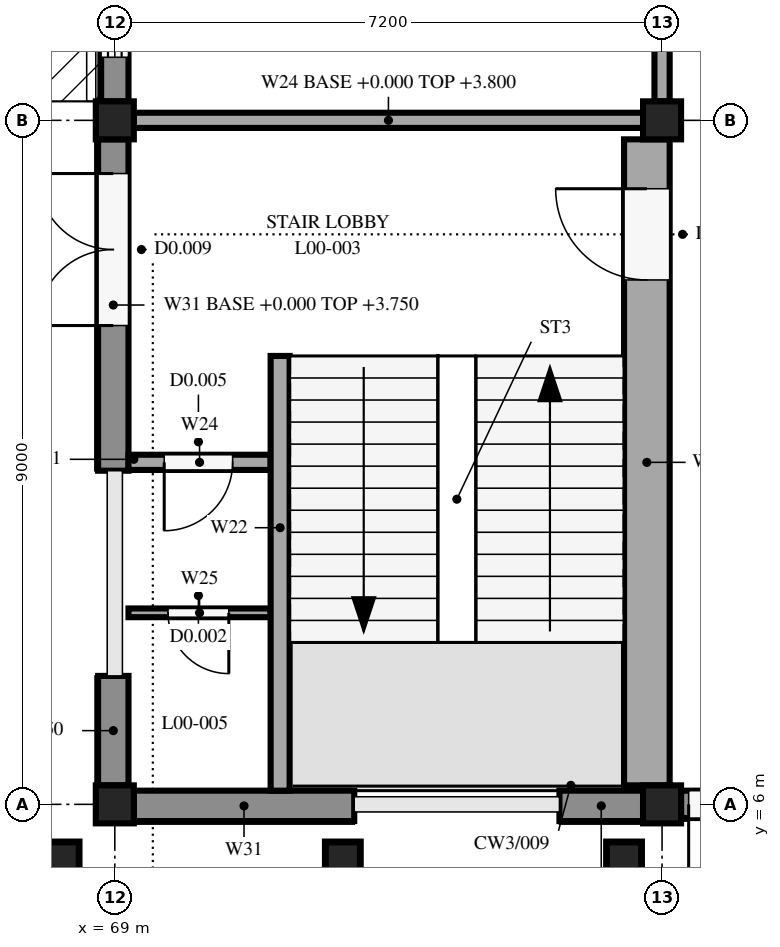
"""IFC4 building model, lengths in metres.
Left out: names, types, materials, properties, quantities, classifications, styles, units other than length and angle.
Written with IfcOpenShell. Run it as: python <this file> out.ifc"""

import sys

from ifc_helpers import new_model, si_unit, direction, frame, frame_2d, origin, origin_2d, place, context, subcontext, project, spatial, rectangle, extrude, element, fill, save


model = new_model("IFC4")
c1 = context("Model", 3, precision=1e-05, world=origin(), true_north=direction((0.0, 1.0)))
c2 = subcontext(c1, "Body", "Model", "MODEL_VIEW")
j1 = project(units=[si_unit("LENGTHUNIT", "METRE"), si_unit("PLANEANGLEUNIT", "RADIAN")], contexts=[c1])
p1 = place(None, origin())
s1 = spatial("IfcSite", under=j1, at=p1, CompositionType="ELEMENT")
p2 = place(p1, origin())
s2 = spatial("IfcBuilding", under=s1, at=p2, CompositionType="ELEMENT")
p3 = place(p2, origin())
s3 = spatial("IfcBuildingStorey", under=s2, at=p3, CompositionType="ELEMENT", Elevation=0.0)
for number, where, z_axis, x_axis in (
    (1, (69.0, 6.0, 0.0), (0.0, 0.0, 1.0), (1.0, 0.0, 0.0)),
    (2, (69.0, 15.0, 0.0), (0.0, 0.0, 1.0), (1.0, 0.0, 0.0)),
    (3, (76.2, 6.0, 0.0), (0.0, 0.0, 1.0), (1.0, 0.0, 0.0)),
    (4, (76.2, 15.0, 0.0), (0.0, 0.0, 1.0), (1.0, 0.0, 0.0)),
):
    element("IfcColumn", number, at=place(p3, frame(where, z_axis=z_axis, x_axis=x_axis)), inside=s3, PredefinedType="COLUMN", context=c2, shape_type="SweptSolid", body=[
        extrude(rectangle(XDim=0.5, YDim=0.5, at=origin_2d()), origin(), (0.0, 0.0, 1.0), 4.25),
    ])
for number, where, z_axis, x_axis in (
    (5, (68.3, 5.275, -0.3), (0.0, 0.0, 1.0), (1.0, 0.0, 0.0)),
    (6, (72.0, 5.275, -0.3), (0.0, 0.0, 1.0), (1.0, 0.0, 0.0)),
    (7, (75.7, 5.275, -0.3), (0.0, 0.0, 1.0), (1.0, 0.0, 0.0)),
):
    element("IfcColumn", number, at=place(p3, frame(where, z_axis=z_axis, x_axis=x_axis)), inside=s3, PredefinedType="COLUMN", context=c2, shape_type="SweptSolid", body=[
        extrude(rectangle(XDim=0.45, YDim=0.45, at=origin_2d()), origin(), (0.0, 0.0, 1.0), 3.95),
    ])
p4 = place(p3, frame((68.98, 6.25, 0.0), z_axis=(0.0, 0.0, 1.0), x_axis=(0.0, 1.0, 0.0)))
e8 = element("IfcWall", 8, at=p4, inside=s3, PredefinedType="STANDARD", context=c2, shape_type="SweptSolid", body=[
    extrude(rectangle(XDim=1.44, YDim=0.4, at=frame_2d((0.72, 0.0))), origin(), (0.0, 0.0, 1.0), 3.75),
])
p5 = place(p3, frame((68.98, 10.39, 0.0), z_axis=(0.0, 0.0, 1.0), x_axis=(0.0, 1.0, 0.0)))
e9 = element("IfcWall", 9, at=p5, inside=s3, PredefinedType="STANDARD", context=c2, shape_type="SweptSolid", body=[
    extrude(rectangle(XDim=4.36, YDim=0.4, at=frame_2d((2.18, 0.0))), origin(), (0.0, 0.0, 1.0), 3.75),
])
p6 = place(p5, frame((1.91, 0.0, 0.0)))
e10 = element("IfcOpeningElement", 10, at=p6, cuts=e9, PredefinedType="OPENING", context=c2, shape_type="SweptSolid", body=[
    extrude(rectangle(XDim=2.0, YDim=2.2, at=frame_2d((1.0, 1.1))), frame((0.0, 0.21, 0.0), z_axis=(0.0, -1.0, 0.0), x_axis=(1.0, 0.0, 0.0)), (0.0, 0.0, 1.0), 0.42),
])
p7 = place(p3, frame((69.0, 15.25, 0.0), z_axis=(0.0, 0.0, 1.0), x_axis=(0.0, 1.0, 0.0)))
e11 = element("IfcWall", 11, at=p7, inside=s3, PredefinedType="STANDARD", context=c2, shape_type="SweptSolid", body=[
    extrude(rectangle(XDim=8.5, YDim=0.36, at=frame_2d((4.25, 0.0))), origin(), (0.0, 0.0, 1.0), 3.75),
])
p8 = place(p7, frame((0.58, 0.0, 2.2)))
e12 = element("IfcOpeningElement", 12, at=p8, cuts=e11, PredefinedType="OPENING", context=c2, shape_type="SweptSolid", body=[
    extrude(rectangle(XDim=1.4, YDim=1.2, at=frame_2d((0.7, 0.6))), frame((0.0, 0.19, 0.0), z_axis=(0.0, -1.0, 0.0), x_axis=(1.0, 0.0, 0.0)), (0.0, 0.0, 1.0), 0.38),
])
p9 = place(p7, frame((3.625, 0.0, 0.0)))
e13 = element("IfcOpeningElement", 13, at=p9, cuts=e11, PredefinedType="OPENING", context=c2, shape_type="SweptSolid", body=[
    extrude(rectangle(XDim=1.2, YDim=2.1, at=frame_2d((0.6, 1.05))), frame((0.0, 0.19, 0.0), z_axis=(0.0, -1.0, 0.0), x_axis=(1.0, 0.0, 0.0)), (0.0, 0.0, 1.0), 0.38),
])
p10 = place(p7, frame((6.52, 0.0, 2.2)))
e14 = element("IfcOpeningElement", 14, at=p10, cuts=e11, PredefinedType="OPENING", context=c2, shape_type="SweptSolid", body=[
    extrude(rectangle(XDim=1.4, YDim=1.2, at=frame_2d((0.7, 0.6))), frame((0.0, 0.19, 0.0), z_axis=(0.0, -1.0, 0.0), x_axis=(1.0, 0.0, 0.0)), (0.0, 0.0, 1.0), 0.38),
])
p11 = place(p3, frame((72.15, 5.98, 0.0), z_axis=(0.0, 0.0, 1.0), x_axis=(-1.0, 0.0, 0.0)))
e15 = element("IfcWall", 15, at=p11, inside=s3, PredefinedType="STANDARD", context=c2, shape_type="SweptSolid", body=[
    extrude(rectangle(XDim=2.9, YDim=0.4, at=frame_2d((1.45, 0.0))), origin(), (0.0, 0.0, 1.0), 3.8),
])
p12 = place(p3, frame((75.95, 5.98, 0.0), z_axis=(0.0, 0.0, 1.0), x_axis=(-1.0, 0.0, 0.0)))
e16 = element("IfcWall", 16, at=p12, inside=s3, PredefinedType="STANDARD", context=c2, shape_type="SweptSolid", body=[
    extrude(rectangle(XDim=1.1, YDim=0.4, at=frame_2d((0.55, 0.0))), origin(), (0.0, 0.0, 1.0), 3.8),
])
p13 = place(p3, frame((78.65, 6.0, 0.0), z_axis=(0.0, 0.0, 1.0), x_axis=(-1.0, 0.0, 0.0)))
e17 = element("IfcWall", 17, at=p13, inside=s3, PredefinedType="STANDARD", context=c2, shape_type="SweptSolid", body=[
    extrude(rectangle(XDim=2.2, YDim=0.36, at=frame_2d((1.1, 0.0))), origin(), (0.0, 0.0, 1.0), 3.9),
])
p14 = place(p13, frame((0.1, 0.0, 0.0)))
e18 = element("IfcOpeningElement", 18, at=p14, cuts=e17, PredefinedType="OPENING", context=c2, shape_type="SweptSolid", body=[
    extrude(rectangle(XDim=2.0, YDim=2.4, at=frame_2d((1.0, 1.2))), frame((0.0, 0.19, 0.0), z_axis=(0.0, -1.0, 0.0), x_axis=(1.0, 0.0, 0.0)), (0.0, 0.0, 1.0), 0.38),
])
p15 = place(p3, frame((71.175, 6.18, 0.0), z_axis=(0.0, 0.0, 1.0), x_axis=(0.0, 1.0, 0.0)))
e19 = element("IfcWall", 19, at=p15, inside=s3, PredefinedType="SOLIDWALL", context=c2, shape_type="SweptSolid", body=[
    extrude(rectangle(XDim=5.72, YDim=0.25, at=frame_2d((2.86, 0.0))), origin(), (0.0, 0.0, 1.0), 4.25),
])
p16 = place(p3, frame((76.0, 6.25, 0.0), z_axis=(0.0, 0.0, 1.0), x_axis=(0.0, 1.0, 0.0)))
e20 = element("IfcWall", 20, at=p16, inside=s3, PredefinedType="SOLIDWALL", context=c2, shape_type="SweptSolid", body=[
    extrude(rectangle(XDim=8.5, YDim=0.6, at=frame_2d((4.25, 0.0))), origin(), (0.0, 0.0, 1.0), 4.25),
])
p17 = place(p16, frame((6.65, 0.0, 0.0)))
e21 = element("IfcOpeningElement", 21, at=p17, cuts=e20, PredefinedType="OPENING", context=c2, shape_type="SweptSolid", body=[
    extrude(rectangle(XDim=1.2, YDim=2.1, at=frame_2d((0.6, 1.05))), frame((0.0, 0.31, 0.0), z_axis=(0.0, -1.0, 0.0), x_axis=(1.0, 0.0, 0.0)), (0.0, 0.0, 1.0), 0.62),
])
p18 = place(p3, frame((71.05, 10.5, 0.0), z_axis=(0.0, 0.0, 1.0), x_axis=(-1.0, 0.0, 0.0)))
e22 = element("IfcWall", 22, at=p18, inside=s3, PredefinedType="SOLIDWALL", context=c2, shape_type="SweptSolid", body=[
    extrude(rectangle(XDim=1.87, YDim=0.2, at=frame_2d((0.935, 0.0))), origin(), (0.0, 0.0, 1.0), 4.25),
])
p19 = place(p18, frame((0.5, 0.0, 0.0)))
e23 = element("IfcOpeningElement", 23, at=p19, cuts=e22, PredefinedType="OPENING", context=c2, shape_type="SweptSolid", body=[
    extrude(rectangle(XDim=0.9, YDim=2.1, at=frame_2d((0.45, 1.05))), frame((0.0, 0.11, 0.0), z_axis=(0.0, -1.0, 0.0), x_axis=(1.0, 0.0, 0.0)), (0.0, 0.0, 1.0), 0.22),
])
p20 = place(p3, frame((71.05, 8.52, 0.0), z_axis=(0.0, 0.0, 1.0), x_axis=(-1.0, 0.0, 0.0)))
e24 = element("IfcWall", 24, at=p20, inside=s3, PredefinedType="PARTITIONING", context=c2, shape_type="SweptSolid", body=[
    extrude(rectangle(XDim=1.87, YDim=0.115, at=frame_2d((0.935, 0.0))), origin(), (0.0, 0.0, 1.0), 4.25),
])
p21 = place(p20, frame((0.55, 0.0, 0.0)))
e25 = element("IfcOpeningElement", 25, at=p21, cuts=e24, PredefinedType="OPENING", context=c2, shape_type="SweptSolid", body=[
    extrude(rectangle(XDim=0.8, YDim=2.1, at=frame_2d((0.4, 1.05))), frame((0.0, 0.067, 0.0), z_axis=(0.0, -1.0, 0.0), x_axis=(1.0, 0.0, 0.0)), (0.0, 0.0, 1.0), 0.135),
])
p22 = place(p3, frame((69.25, 15.0, 0.0), z_axis=(0.0, 0.0, 1.0), x_axis=(1.0, 0.0, 0.0)))
e26 = element("IfcWall", 26, at=p22, inside=s3, PredefinedType="SOLIDWALL", context=c2, shape_type="SweptSolid", body=[
    extrude(rectangle(XDim=6.7, YDim=0.2, at=frame_2d((3.35, 0.0))), origin(), (0.0, 0.0, 1.0), 3.8),
])
p23 = place(p3, frame((76.2, 15.25, 0.0), z_axis=(0.0, 0.0, 1.0), x_axis=(0.0, 1.0, 0.0)))
e27 = element("IfcWall", 27, at=p23, inside=s3, PredefinedType="PARTITIONING", context=c2, shape_type="SweptSolid", body=[
    extrude(rectangle(XDim=8.5, YDim=0.2, at=frame_2d((4.25, 0.0))), origin(), (0.0, 0.0, 1.0), 3.8),
])
p24 = place(p23, frame((3.05, 0.0, 0.0)))
e28 = element("IfcOpeningElement", 28, at=p24, cuts=e27, PredefinedType="OPENING", context=c2, shape_type="SweptSolid", body=[
    extrude(rectangle(XDim=2.4, YDim=2.1, at=frame_2d((1.2, 1.05))), frame((0.0, 0.11, 0.0), z_axis=(0.0, -1.0, 0.0), x_axis=(1.0, 0.0, 0.0)), (0.0, 0.0, 1.0), 0.22),
])
p25 = place(p6, origin())
e29 = element("IfcDoor", 29, at=p25, inside=s3, OperationType="DOUBLE_DOOR_SINGLE_SWING", PredefinedType="DOOR", context=c2, shape_type="SweptSolid", body=[
    extrude(rectangle(XDim=2.0, YDim=2.2, at=frame_2d((1.0, 1.1))), frame((0.0, 0.025, 0.0), z_axis=(0.0, -1.0, 0.0), x_axis=(1.0, 0.0, 0.0)), (0.0, 0.0, 1.0), 0.05),
])
fill(e10, e29)
p26 = place(p8, origin())
e30 = element("IfcWindow", 30, at=p26, inside=s3, PartitioningType="DOUBLE_PANEL_VERTICAL", PredefinedType="WINDOW", context=c2, shape_type="SweptSolid", body=[
    extrude(rectangle(XDim=1.4, YDim=1.2, at=frame_2d((0.7, 0.6))), frame((0.0, 0.03, 0.0), z_axis=(0.0, -1.0, 0.0), x_axis=(1.0, 0.0, 0.0)), (0.0, 0.0, 1.0), 0.06),
])
fill(e12, e30)
p27 = place(p14, origin())
e31 = element("IfcDoor", 31, at=p27, inside=s3, OperationType="DOUBLE_DOOR_SINGLE_SWING", PredefinedType="DOOR", context=c2, shape_type="SweptSolid", body=[
    extrude(rectangle(XDim=2.0, YDim=2.4, at=frame_2d((1.0, 1.2))), frame((0.0, 0.025, 0.0), z_axis=(0.0, -1.0, 0.0), x_axis=(1.0, 0.0, 0.0)), (0.0, 0.0, 1.0), 0.05),
])
fill(e18, e31)
p28 = place(p17, origin())
e32 = element("IfcDoor", 32, at=p28, inside=s3, OperationType="SINGLE_SWING_RIGHT", PredefinedType="DOOR", context=c2, shape_type="SweptSolid", body=[
    extrude(rectangle(XDim=1.2, YDim=2.1, at=frame_2d((0.6, 1.05))), frame((0.0, 0.025, 0.0), z_axis=(0.0, -1.0, 0.0), x_axis=(1.0, 0.0, 0.0)), (0.0, 0.0, 1.0), 0.05),
])
fill(e21, e32)
p29 = place(p19, origin())
e33 = element("IfcDoor", 33, at=p29, inside=s3, OperationType="SINGLE_SWING_RIGHT", PredefinedType="DOOR", context=c2, shape_type="SweptSolid", body=[
    extrude(rectangle(XDim=0.9, YDim=2.1, at=frame_2d((0.45, 1.05))), frame((0.0, 0.025, 0.0), z_axis=(0.0, -1.0, 0.0), x_axis=(1.0, 0.0, 0.0)), (0.0, 0.0, 1.0), 0.05),
])
fill(e23, e33)
p30 = place(p21, origin())
e34 = element("IfcDoor", 34, at=p30, inside=s3, OperationType="SINGLE_SWING_LEFT", PredefinedType="DOOR", context=c2, shape_type="SweptSolid", body=[
    extrude(rectangle(XDim=0.8, YDim=2.1, at=frame_2d((0.4, 1.05))), frame((0.0, 0.025, 0.0), z_axis=(0.0, -1.0, 0.0), x_axis=(1.0, 0.0, 0.0)), (0.0, 0.0, 1.0), 0.05),
])
fill(e25, e34)
save(model, sys.argv[1])
